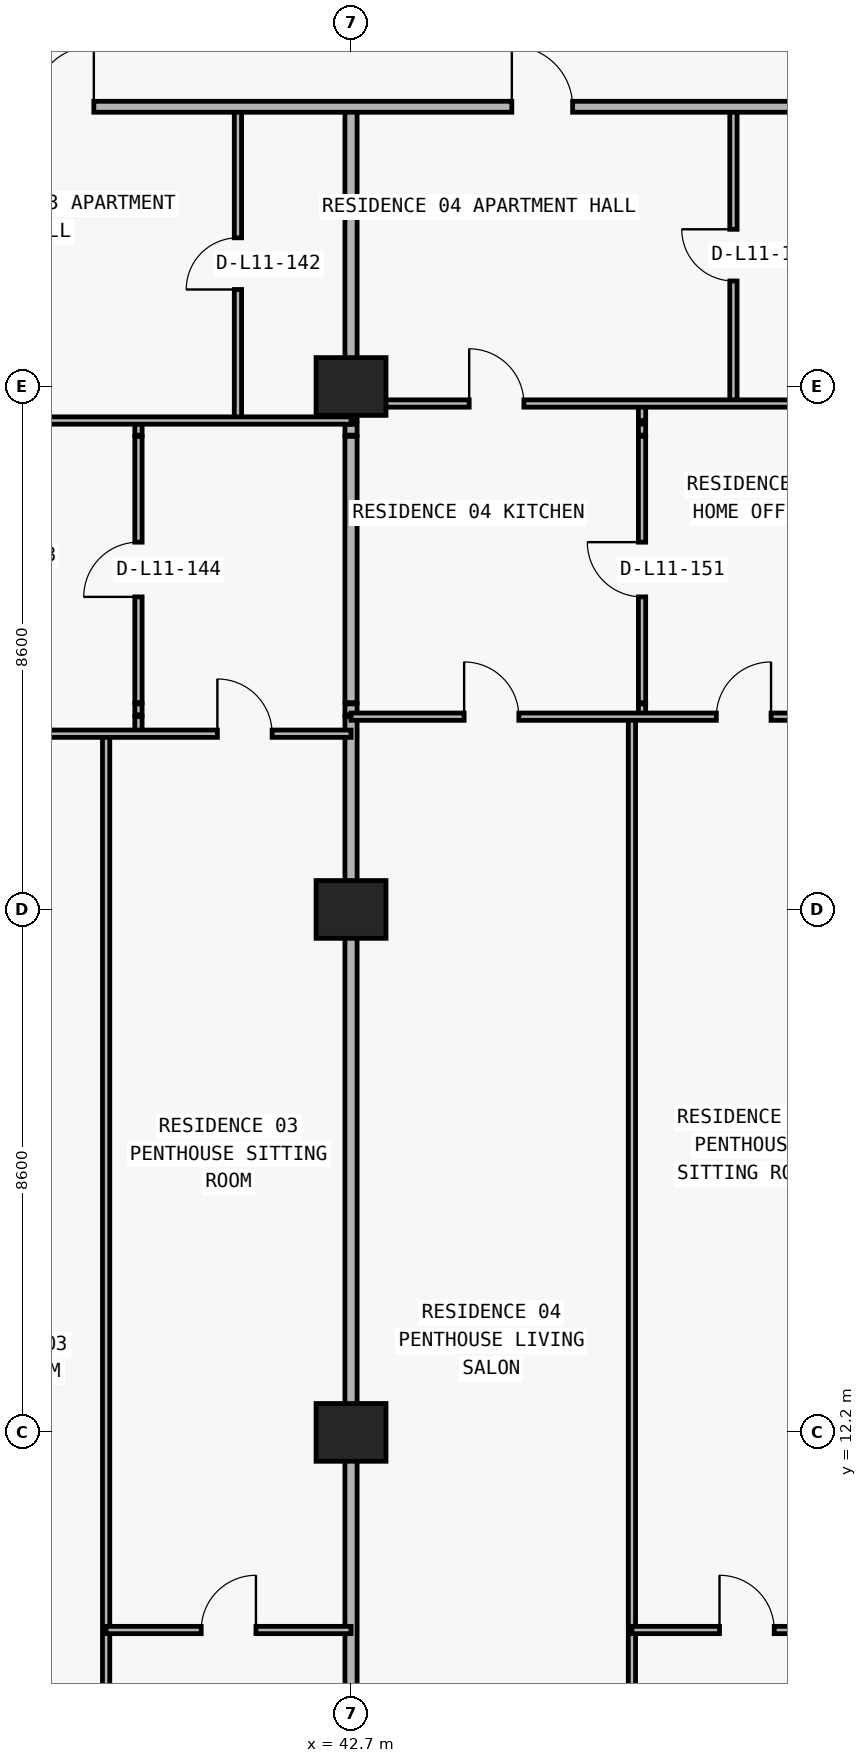
"""IFC4 building model, lengths in metres.
Left out: names, types, materials, properties, quantities, classifications, styles, units other than length and angle.
Written with IfcOpenShell. Run it as: python <this file> out.ifc"""

import sys

from ifc_helpers import new_model, si_unit, direction, frame, frame_2d, origin, origin_2d, place, context, subcontext, project, spatial, rectangle, extrude, element, fill, save


model = new_model("IFC4")
c1 = context("Model", 3, precision=1e-05, world=origin(), true_north=direction((0.0, 1.0)))
c2 = subcontext(c1, "Body", "Model", "MODEL_VIEW")
j1 = project(units=[si_unit("LENGTHUNIT", "METRE"), si_unit("PLANEANGLEUNIT", "RADIAN")], contexts=[c1])
p1 = place(None, origin())
s1 = spatial("IfcSite", under=j1, at=p1, CompositionType="ELEMENT")
p2 = place(p1, origin())
s2 = spatial("IfcBuilding", under=s1, at=p2, CompositionType="ELEMENT")
p3 = place(p2, frame((0.0, 0.0, 46.5)))
s3 = spatial("IfcBuildingStorey", under=s2, at=p3, CompositionType="ELEMENT", Elevation=46.5)
for number, where, z_axis, x_axis in (
    (1, (42.7, 12.2, 0.0), (0.0, 0.0, 1.0), (1.0, 0.0, 0.0)),
    (2, (42.7, 20.8, 0.0), (0.0, 0.0, 1.0), (1.0, 0.0, 0.0)),
    (3, (42.7, 29.4, 0.0), (0.0, 0.0, 1.0), (1.0, 0.0, 0.0)),
):
    element("IfcColumn", number, at=place(p3, frame(where, z_axis=z_axis, x_axis=x_axis)), inside=s3, PredefinedType="COLUMN", context=c2, shape_type="SweptSolid", body=[
        extrude(rectangle(XDim=1.15, YDim=0.95, at=origin_2d()), origin(), (0.0, 0.0, 1.0), 3.05),
    ])
p4 = place(p3, frame((38.672, 6.24, 0.0), z_axis=(0.0, 0.0, 1.0), x_axis=(0.0, 1.0, 0.0)))
e4 = element("IfcWall", 4, at=p4, inside=s3, PredefinedType="PARTITIONING", context=c2, shape_type="SweptSolid", body=[
    extrude(rectangle(XDim=17.45, YDim=0.12, at=frame_2d((8.725, 0.0))), origin(), (0.0, 0.0, 1.0), 3.05),
])
p5 = place(p3, frame((39.204, 23.69, 0.0), z_axis=(0.0, 0.0, 1.0), x_axis=(0.0, 1.0, 0.0)))
e5 = element("IfcWall", 5, at=p5, inside=s3, PredefinedType="PARTITIONING", context=c2, shape_type="SweptSolid", body=[
    extrude(rectangle(XDim=0.28, YDim=0.12, at=frame_2d((0.14, 0.0))), origin(), (0.0, 0.0, 1.0), 3.05),
])
p6 = place(p3, frame((39.204, 24.0, 0.0), z_axis=(0.0, 0.0, 1.0), x_axis=(0.0, 1.0, 0.0)))
e6 = element("IfcWall", 6, at=p6, inside=s3, PredefinedType="PARTITIONING", context=c2, shape_type="SweptSolid", body=[
    extrude(rectangle(XDim=0.18, YDim=0.12, at=frame_2d((0.09, 0.0))), origin(), (0.0, 0.0, 1.0), 3.05),
])
p7 = place(p3, frame((39.204, 24.2, 0.0), z_axis=(0.0, 0.0, 1.0), x_axis=(0.0, 1.0, 0.0)))
e7 = element("IfcWall", 7, at=p7, inside=s3, PredefinedType="PARTITIONING", context=c2, shape_type="SweptSolid", body=[
    extrude(rectangle(XDim=4.38, YDim=0.12, at=frame_2d((2.19, 0.0))), origin(), (0.0, 0.0, 1.0), 3.05),
])
p8 = place(p7, frame((1.74, 0.0, 0.0)))
e8 = element("IfcOpeningElement", 8, at=p8, cuts=e7, PredefinedType="OPENING", context=c2, shape_type="SweptSolid", body=[
    extrude(rectangle(XDim=0.9, YDim=2.15, at=frame_2d((0.45, 1.075))), frame((0.0, 0.07, 0.0), z_axis=(0.0, -1.0, 0.0), x_axis=(1.0, 0.0, 0.0)), (0.0, 0.0, 1.0), 0.14),
])
p9 = place(p3, frame((39.204, 28.6, 0.0), z_axis=(0.0, 0.0, 1.0), x_axis=(0.0, 1.0, 0.0)))
e9 = element("IfcWall", 9, at=p9, inside=s3, PredefinedType="PARTITIONING", context=c2, shape_type="SweptSolid", body=[
    extrude(rectangle(XDim=0.18, YDim=0.12, at=frame_2d((0.09, 0.0))), origin(), (0.0, 0.0, 1.0), 3.05),
])
p10 = place(p3, frame((40.84, 28.84, 0.0), z_axis=(0.0, 0.0, 1.0), x_axis=(0.0, 1.0, 0.0)))
e10 = element("IfcWall", 10, at=p10, inside=s3, PredefinedType="PARTITIONING", context=c2, shape_type="SweptSolid", body=[
    extrude(rectangle(XDim=5.16, YDim=0.12, at=frame_2d((2.58, 0.0))), origin(), (0.0, 0.0, 1.0), 3.05),
])
p11 = place(p10, frame((2.155, 0.0, 0.0)))
e11 = element("IfcOpeningElement", 11, at=p11, cuts=e10, PredefinedType="OPENING", context=c2, shape_type="SweptSolid", body=[
    extrude(rectangle(XDim=0.85, YDim=2.1, at=frame_2d((0.425, 1.05))), frame((0.0, 0.07, 0.0), z_axis=(0.0, -1.0, 0.0), x_axis=(1.0, 0.0, 0.0)), (0.0, 0.0, 1.0), 0.14),
])
p12 = place(p3, frame((42.7, 6.24, 0.0), z_axis=(0.0, 0.0, 1.0), x_axis=(0.0, 1.0, 0.0)))
e12 = element("IfcWall", 12, at=p12, inside=s3, PredefinedType="PARTITIONING", context=c2, shape_type="SweptSolid", body=[
    extrude(rectangle(XDim=17.73, YDim=0.2, at=frame_2d((8.865, 0.0))), origin(), (0.0, 0.0, 1.0), 2.11),
])
p13 = place(p3, frame((42.7, 24.0, 0.0), z_axis=(0.0, 0.0, 1.0), x_axis=(0.0, 1.0, 0.0)))
e13 = element("IfcWall", 13, at=p13, inside=s3, PredefinedType="PARTITIONING", context=c2, shape_type="SweptSolid", body=[
    extrude(rectangle(XDim=0.18, YDim=0.2, at=frame_2d((0.09, 0.0))), origin(), (0.0, 0.0, 1.0), 2.11),
])
p14 = place(p3, frame((42.7, 24.2, 0.0), z_axis=(0.0, 0.0, 1.0), x_axis=(0.0, 1.0, 0.0)))
e14 = element("IfcWall", 14, at=p14, inside=s3, PredefinedType="PARTITIONING", context=c2, shape_type="SweptSolid", body=[
    extrude(rectangle(XDim=4.38, YDim=0.2, at=frame_2d((2.19, 0.0))), origin(), (0.0, 0.0, 1.0), 2.11),
])
p15 = place(p3, frame((42.7, 28.6, 0.0), z_axis=(0.0, 0.0, 1.0), x_axis=(0.0, 1.0, 0.0)))
e15 = element("IfcWall", 15, at=p15, inside=s3, PredefinedType="PARTITIONING", context=c2, shape_type="SweptSolid", body=[
    extrude(rectangle(XDim=0.18, YDim=0.2, at=frame_2d((0.09, 0.0))), origin(), (0.0, 0.0, 1.0), 2.11),
])
p16 = place(p3, frame((42.7, 28.84, 0.0), z_axis=(0.0, 0.0, 1.0), x_axis=(0.0, 1.0, 0.0)))
e16 = element("IfcWall", 16, at=p16, inside=s3, PredefinedType="PARTITIONING", context=c2, shape_type="SweptSolid", body=[
    extrude(rectangle(XDim=5.16, YDim=0.2, at=frame_2d((2.58, 0.0))), origin(), (0.0, 0.0, 1.0), 2.11),
])
p17 = place(p3, frame((47.32, 6.24, 0.0), z_axis=(0.0, 0.0, 1.0), x_axis=(0.0, 1.0, 0.0)))
e17 = element("IfcWall", 17, at=p17, inside=s3, PredefinedType="PARTITIONING", context=c2, shape_type="SweptSolid", body=[
    extrude(rectangle(XDim=17.73, YDim=0.12, at=frame_2d((8.865, 0.0))), origin(), (0.0, 0.0, 1.0), 3.05),
])
p18 = place(p3, frame((47.486, 24.0, 0.0), z_axis=(0.0, 0.0, 1.0), x_axis=(0.0, 1.0, 0.0)))
e18 = element("IfcWall", 18, at=p18, inside=s3, PredefinedType="PARTITIONING", context=c2, shape_type="SweptSolid", body=[
    extrude(rectangle(XDim=0.18, YDim=0.12, at=frame_2d((0.09, 0.0))), origin(), (0.0, 0.0, 1.0), 3.05),
])
p19 = place(p3, frame((47.486, 24.2, 0.0), z_axis=(0.0, 0.0, 1.0), x_axis=(0.0, 1.0, 0.0)))
e19 = element("IfcWall", 19, at=p19, inside=s3, PredefinedType="PARTITIONING", context=c2, shape_type="SweptSolid", body=[
    extrude(rectangle(XDim=4.38, YDim=0.12, at=frame_2d((2.19, 0.0))), origin(), (0.0, 0.0, 1.0), 3.05),
])
p20 = place(p19, frame((1.74, 0.0, 0.0)))
e20 = element("IfcOpeningElement", 20, at=p20, cuts=e19, PredefinedType="OPENING", context=c2, shape_type="SweptSolid", body=[
    extrude(rectangle(XDim=0.9, YDim=2.15, at=frame_2d((0.45, 1.075))), frame((0.0, 0.07, 0.0), z_axis=(0.0, -1.0, 0.0), x_axis=(1.0, 0.0, 0.0)), (0.0, 0.0, 1.0), 0.14),
])
p21 = place(p3, frame((47.486, 28.6, 0.0), z_axis=(0.0, 0.0, 1.0), x_axis=(0.0, 1.0, 0.0)))
e21 = element("IfcWall", 21, at=p21, inside=s3, PredefinedType="PARTITIONING", context=c2, shape_type="SweptSolid", body=[
    extrude(rectangle(XDim=0.18, YDim=0.12, at=frame_2d((0.09, 0.0))), origin(), (0.0, 0.0, 1.0), 3.05),
])
p22 = place(p3, frame((47.486, 28.84, 0.0), z_axis=(0.0, 0.0, 1.0), x_axis=(0.0, 1.0, 0.0)))
e22 = element("IfcWall", 22, at=p22, inside=s3, PredefinedType="PARTITIONING", context=c2, shape_type="SweptSolid", body=[
    extrude(rectangle(XDim=0.28, YDim=0.12, at=frame_2d((0.14, 0.0))), origin(), (0.0, 0.0, 1.0), 3.05),
])
p23 = place(p3, frame((48.989, 29.12, 0.0), z_axis=(0.0, 0.0, 1.0), x_axis=(0.0, 1.0, 0.0)))
e23 = element("IfcWall", 23, at=p23, inside=s3, PredefinedType="PARTITIONING", context=c2, shape_type="SweptSolid", body=[
    extrude(rectangle(XDim=4.88, YDim=0.12, at=frame_2d((2.44, 0.0))), origin(), (0.0, 0.0, 1.0), 3.05),
])
p24 = place(p23, frame((2.015, 0.0, 0.0)))
e24 = element("IfcOpeningElement", 24, at=p24, cuts=e23, PredefinedType="OPENING", context=c2, shape_type="SweptSolid", body=[
    extrude(rectangle(XDim=0.85, YDim=2.1, at=frame_2d((0.425, 1.05))), frame((0.0, 0.07, 0.0), z_axis=(0.0, -1.0, 0.0), x_axis=(1.0, 0.0, 0.0)), (0.0, 0.0, 1.0), 0.14),
])
p25 = place(p3, frame((38.672, 8.95, 0.0), z_axis=(0.0, 0.0, 1.0), x_axis=(1.0, 0.0, 0.0)))
e25 = element("IfcWall", 25, at=p25, inside=s3, PredefinedType="PARTITIONING", context=c2, shape_type="SweptSolid", body=[
    extrude(rectangle(XDim=4.028, YDim=0.12, at=frame_2d((2.014, 0.0))), origin(), (0.0, 0.0, 1.0), 3.05),
])
p26 = place(p25, frame((1.564, 0.0, 0.0)))
e26 = element("IfcOpeningElement", 26, at=p26, cuts=e25, PredefinedType="OPENING", context=c2, shape_type="SweptSolid", body=[
    extrude(rectangle(XDim=0.9, YDim=2.15, at=frame_2d((0.45, 1.075))), frame((0.0, 0.07, 0.0), z_axis=(0.0, -1.0, 0.0), x_axis=(1.0, 0.0, 0.0)), (0.0, 0.0, 1.0), 0.14),
])
p27 = place(p3, frame((47.32, 8.95, 0.0), z_axis=(0.0, 0.0, 1.0), x_axis=(1.0, 0.0, 0.0)))
e27 = element("IfcWall", 27, at=p27, inside=s3, PredefinedType="PARTITIONING", context=c2, shape_type="SweptSolid", body=[
    extrude(rectangle(XDim=3.78, YDim=0.12, at=frame_2d((1.89, 0.0))), origin(), (0.0, 0.0, 1.0), 3.05),
])
p28 = place(p27, frame((1.44, 0.0, 0.0)))
e28 = element("IfcOpeningElement", 28, at=p28, cuts=e27, PredefinedType="OPENING", context=c2, shape_type="SweptSolid", body=[
    extrude(rectangle(XDim=0.9, YDim=2.15, at=frame_2d((0.45, 1.075))), frame((0.0, 0.07, 0.0), z_axis=(0.0, -1.0, 0.0), x_axis=(1.0, 0.0, 0.0)), (0.0, 0.0, 1.0), 0.14),
])
p29 = place(p3, frame((35.1, 23.69, 0.0), z_axis=(0.0, 0.0, 1.0), x_axis=(1.0, 0.0, 0.0)))
e29 = element("IfcWall", 29, at=p29, inside=s3, PredefinedType="PARTITIONING", context=c2, shape_type="SweptSolid", body=[
    extrude(rectangle(XDim=7.6, YDim=0.12, at=frame_2d((3.8, 0.0))), origin(), (0.0, 0.0, 1.0), 3.05),
])
p30 = place(p29, frame((1.336, 0.0, 0.0)))
e30 = element("IfcOpeningElement", 30, at=p30, cuts=e29, PredefinedType="OPENING", context=c2, shape_type="SweptSolid", body=[
    extrude(rectangle(XDim=0.9, YDim=2.15, at=frame_2d((0.45, 1.075))), frame((0.0, 0.07, 0.0), z_axis=(0.0, -1.0, 0.0), x_axis=(1.0, 0.0, 0.0)), (0.0, 0.0, 1.0), 0.14),
])
p31 = place(p29, frame((5.402, 0.0, 0.0)))
e31 = element("IfcOpeningElement", 31, at=p31, cuts=e29, PredefinedType="OPENING", context=c2, shape_type="SweptSolid", body=[
    extrude(rectangle(XDim=0.9, YDim=2.15, at=frame_2d((0.45, 1.075))), frame((0.0, 0.07, 0.0), z_axis=(0.0, -1.0, 0.0), x_axis=(1.0, 0.0, 0.0)), (0.0, 0.0, 1.0), 0.14),
])
p32 = place(p3, frame((42.7, 23.97, 0.0), z_axis=(0.0, 0.0, 1.0), x_axis=(1.0, 0.0, 0.0)))
e32 = element("IfcWall", 32, at=p32, inside=s3, PredefinedType="PARTITIONING", context=c2, shape_type="SweptSolid", body=[
    extrude(rectangle(XDim=8.13, YDim=0.12, at=frame_2d((4.065, 0.0))), origin(), (0.0, 0.0, 1.0), 3.05),
])
p33 = place(p32, frame((1.86, 0.0, 0.0)))
e33 = element("IfcOpeningElement", 33, at=p33, cuts=e32, PredefinedType="OPENING", context=c2, shape_type="SweptSolid", body=[
    extrude(rectangle(XDim=0.9, YDim=2.15, at=frame_2d((0.45, 1.075))), frame((0.0, 0.07, 0.0), z_axis=(0.0, -1.0, 0.0), x_axis=(1.0, 0.0, 0.0)), (0.0, 0.0, 1.0), 0.14),
])
p34 = place(p32, frame((6.008, 0.0, 0.0)))
e34 = element("IfcOpeningElement", 34, at=p34, cuts=e32, PredefinedType="OPENING", context=c2, shape_type="SweptSolid", body=[
    extrude(rectangle(XDim=0.9, YDim=2.15, at=frame_2d((0.45, 1.075))), frame((0.0, 0.07, 0.0), z_axis=(0.0, -1.0, 0.0), x_axis=(1.0, 0.0, 0.0)), (0.0, 0.0, 1.0), 0.14),
])
p35 = place(p3, frame((35.1, 28.84, 0.0), z_axis=(0.0, 0.0, 1.0), x_axis=(1.0, 0.0, 0.0)))
e35 = element("IfcWall", 35, at=p35, inside=s3, PredefinedType="PARTITIONING", context=c2, shape_type="SweptSolid", body=[
    extrude(rectangle(XDim=7.6, YDim=0.12, at=frame_2d((3.8, 0.0))), origin(), (0.0, 0.0, 1.0), 3.05),
])
p36 = place(p35, frame((1.602, 0.0, 0.0)))
e36 = element("IfcOpeningElement", 36, at=p36, cuts=e35, PredefinedType="OPENING", context=c2, shape_type="SweptSolid", body=[
    extrude(rectangle(XDim=0.9, YDim=2.15, at=frame_2d((0.45, 1.075))), frame((0.0, 0.07, 0.0), z_axis=(0.0, -1.0, 0.0), x_axis=(1.0, 0.0, 0.0)), (0.0, 0.0, 1.0), 0.14),
])
p37 = place(p3, frame((42.7, 29.12, 0.0), z_axis=(0.0, 0.0, 1.0), x_axis=(1.0, 0.0, 0.0)))
e37 = element("IfcWall", 37, at=p37, inside=s3, PredefinedType="PARTITIONING", context=c2, shape_type="SweptSolid", body=[
    extrude(rectangle(XDim=8.13, YDim=0.12, at=frame_2d((4.065, 0.0))), origin(), (0.0, 0.0, 1.0), 2.11),
])
p38 = place(p37, frame((1.943, 0.0, 0.0)))
e38 = element("IfcOpeningElement", 38, at=p38, cuts=e37, PredefinedType="OPENING", context=c2, shape_type="SweptSolid", body=[
    extrude(rectangle(XDim=0.9, YDim=2.06, at=frame_2d((0.45, 1.03))), frame((0.0, 0.07, 0.0), z_axis=(0.0, -1.0, 0.0), x_axis=(1.0, 0.0, 0.0)), (0.0, 0.0, 1.0), 0.14),
])
p39 = place(p3, frame((31.4, 34.0, 0.0), z_axis=(0.0, 0.0, 1.0), x_axis=(1.0, 0.0, 0.0)))
e39 = element("IfcWall", 39, at=p39, inside=s3, PredefinedType="PARTITIONING", context=c2, shape_type="SweptSolid", body=[
    extrude(rectangle(XDim=41.3, YDim=0.18, at=frame_2d((20.65, 0.0))), origin(), (0.0, 0.0, 1.0), 3.05),
])
p40 = place(p39, frame((6.07, 0.0, 0.0)))
e40 = element("IfcOpeningElement", 40, at=p40, cuts=e39, PredefinedType="OPENING", context=c2, shape_type="SweptSolid", body=[
    extrude(rectangle(XDim=1.0, YDim=2.2, at=frame_2d((0.5, 1.1))), frame((0.0, 0.1, 0.0), z_axis=(0.0, -1.0, 0.0), x_axis=(1.0, 0.0, 0.0)), (0.0, 0.0, 1.0), 0.2),
])
p41 = place(p39, frame((13.945, 0.0, 0.0)))
e41 = element("IfcOpeningElement", 41, at=p41, cuts=e39, PredefinedType="OPENING", context=c2, shape_type="SweptSolid", body=[
    extrude(rectangle(XDim=1.0, YDim=2.2, at=frame_2d((0.5, 1.1))), frame((0.0, 0.1, 0.0), z_axis=(0.0, -1.0, 0.0), x_axis=(1.0, 0.0, 0.0)), (0.0, 0.0, 1.0), 0.2),
])
p42 = place(p39, frame((22.414, 0.0, 0.0)))
e42 = element("IfcOpeningElement", 42, at=p42, cuts=e39, PredefinedType="OPENING", context=c2, shape_type="SweptSolid", body=[
    extrude(rectangle(XDim=1.0, YDim=2.2, at=frame_2d((0.5, 1.1))), frame((0.0, 0.1, 0.0), z_axis=(0.0, -1.0, 0.0), x_axis=(1.0, 0.0, 0.0)), (0.0, 0.0, 1.0), 0.2),
])
p43 = place(p40, origin())
e43 = element("IfcDoor", 43, at=p43, inside=s3, OperationType="SINGLE_SWING_RIGHT", PredefinedType="DOOR", context=c2, shape_type="SweptSolid", body=[
    extrude(rectangle(XDim=1.0, YDim=2.2, at=frame_2d((0.5, 1.1))), frame((0.0, 0.025, 0.0), z_axis=(0.0, -1.0, 0.0), x_axis=(1.0, 0.0, 0.0)), (0.0, 0.0, 1.0), 0.05),
])
fill(e40, e43)
p44 = place(p11, origin())
e44 = element("IfcDoor", 44, at=p44, inside=s3, OperationType="SINGLE_SWING_LEFT", PredefinedType="DOOR", context=c2, shape_type="SweptSolid", body=[
    extrude(rectangle(XDim=0.85, YDim=2.1, at=frame_2d((0.425, 1.05))), frame((0.0, 0.025, 0.0), z_axis=(0.0, -1.0, 0.0), x_axis=(1.0, 0.0, 0.0)), (0.0, 0.0, 1.0), 0.05),
])
fill(e11, e44)
p45 = place(p8, origin())
e45 = element("IfcDoor", 45, at=p45, inside=s3, OperationType="SINGLE_SWING_LEFT", PredefinedType="DOOR", context=c2, shape_type="SweptSolid", body=[
    extrude(rectangle(XDim=0.9, YDim=2.15, at=frame_2d((0.45, 1.075))), frame((0.0, 0.025, 0.0), z_axis=(0.0, -1.0, 0.0), x_axis=(1.0, 0.0, 0.0)), (0.0, 0.0, 1.0), 0.05),
])
fill(e8, e45)
p46 = place(p31, origin())
e46 = element("IfcDoor", 46, at=p46, inside=s3, OperationType="SINGLE_SWING_LEFT", PredefinedType="DOOR", context=c2, shape_type="SweptSolid", body=[
    extrude(rectangle(XDim=0.9, YDim=2.15, at=frame_2d((0.45, 1.075))), frame((0.0, 0.025, 0.0), z_axis=(0.0, -1.0, 0.0), x_axis=(1.0, 0.0, 0.0)), (0.0, 0.0, 1.0), 0.05),
])
fill(e31, e46)
p47 = place(p26, origin())
e47 = element("IfcDoor", 47, at=p47, inside=s3, OperationType="SINGLE_SWING_RIGHT", PredefinedType="DOOR", context=c2, shape_type="SweptSolid", body=[
    extrude(rectangle(XDim=0.9, YDim=2.15, at=frame_2d((0.45, 1.075))), frame((0.0, 0.025, 0.0), z_axis=(0.0, -1.0, 0.0), x_axis=(1.0, 0.0, 0.0)), (0.0, 0.0, 1.0), 0.05),
])
fill(e26, e47)
p48 = place(p41, origin())
e48 = element("IfcDoor", 48, at=p48, inside=s3, OperationType="SINGLE_SWING_LEFT", PredefinedType="DOOR", context=c2, shape_type="SweptSolid", body=[
    extrude(rectangle(XDim=1.0, YDim=2.2, at=frame_2d((0.5, 1.1))), frame((0.0, 0.025, 0.0), z_axis=(0.0, -1.0, 0.0), x_axis=(1.0, 0.0, 0.0)), (0.0, 0.0, 1.0), 0.05),
])
fill(e41, e48)
p49 = place(p24, origin())
e49 = element("IfcDoor", 49, at=p49, inside=s3, OperationType="SINGLE_SWING_RIGHT", PredefinedType="DOOR", context=c2, shape_type="SweptSolid", body=[
    extrude(rectangle(XDim=0.85, YDim=2.1, at=frame_2d((0.425, 1.05))), frame((0.0, 0.025, 0.0), z_axis=(0.0, -1.0, 0.0), x_axis=(1.0, 0.0, 0.0)), (0.0, 0.0, 1.0), 0.05),
])
fill(e24, e49)
p50 = place(p38, origin())
e50 = element("IfcDoor", 50, at=p50, inside=s3, OperationType="SINGLE_SWING_LEFT", PredefinedType="DOOR", context=c2, shape_type="SweptSolid", body=[
    extrude(rectangle(XDim=0.9, YDim=2.06, at=frame_2d((0.45, 1.03))), frame((0.0, 0.025, 0.0), z_axis=(0.0, -1.0, 0.0), x_axis=(1.0, 0.0, 0.0)), (0.0, 0.0, 1.0), 0.05),
])
fill(e38, e50)
p51 = place(p20, origin())
e51 = element("IfcDoor", 51, at=p51, inside=s3, OperationType="SINGLE_SWING_RIGHT", PredefinedType="DOOR", context=c2, shape_type="SweptSolid", body=[
    extrude(rectangle(XDim=0.9, YDim=2.15, at=frame_2d((0.45, 1.075))), frame((0.0, 0.025, 0.0), z_axis=(0.0, -1.0, 0.0), x_axis=(1.0, 0.0, 0.0)), (0.0, 0.0, 1.0), 0.05),
])
fill(e20, e51)
p52 = place(p33, origin())
e52 = element("IfcDoor", 52, at=p52, inside=s3, OperationType="SINGLE_SWING_LEFT", PredefinedType="DOOR", context=c2, shape_type="SweptSolid", body=[
    extrude(rectangle(XDim=0.9, YDim=2.15, at=frame_2d((0.45, 1.075))), frame((0.0, 0.025, 0.0), z_axis=(0.0, -1.0, 0.0), x_axis=(1.0, 0.0, 0.0)), (0.0, 0.0, 1.0), 0.05),
])
fill(e33, e52)
p53 = place(p34, origin())
e53 = element("IfcDoor", 53, at=p53, inside=s3, OperationType="SINGLE_SWING_RIGHT", PredefinedType="DOOR", context=c2, shape_type="SweptSolid", body=[
    extrude(rectangle(XDim=0.9, YDim=2.15, at=frame_2d((0.45, 1.075))), frame((0.0, 0.025, 0.0), z_axis=(0.0, -1.0, 0.0), x_axis=(1.0, 0.0, 0.0)), (0.0, 0.0, 1.0), 0.05),
])
fill(e34, e53)
p54 = place(p28, origin())
e54 = element("IfcDoor", 54, at=p54, inside=s3, OperationType="SINGLE_SWING_LEFT", PredefinedType="DOOR", context=c2, shape_type="SweptSolid", body=[
    extrude(rectangle(XDim=0.9, YDim=2.15, at=frame_2d((0.45, 1.075))), frame((0.0, 0.025, 0.0), z_axis=(0.0, -1.0, 0.0), x_axis=(1.0, 0.0, 0.0)), (0.0, 0.0, 1.0), 0.05),
])
fill(e28, e54)
save(model, sys.argv[1])
